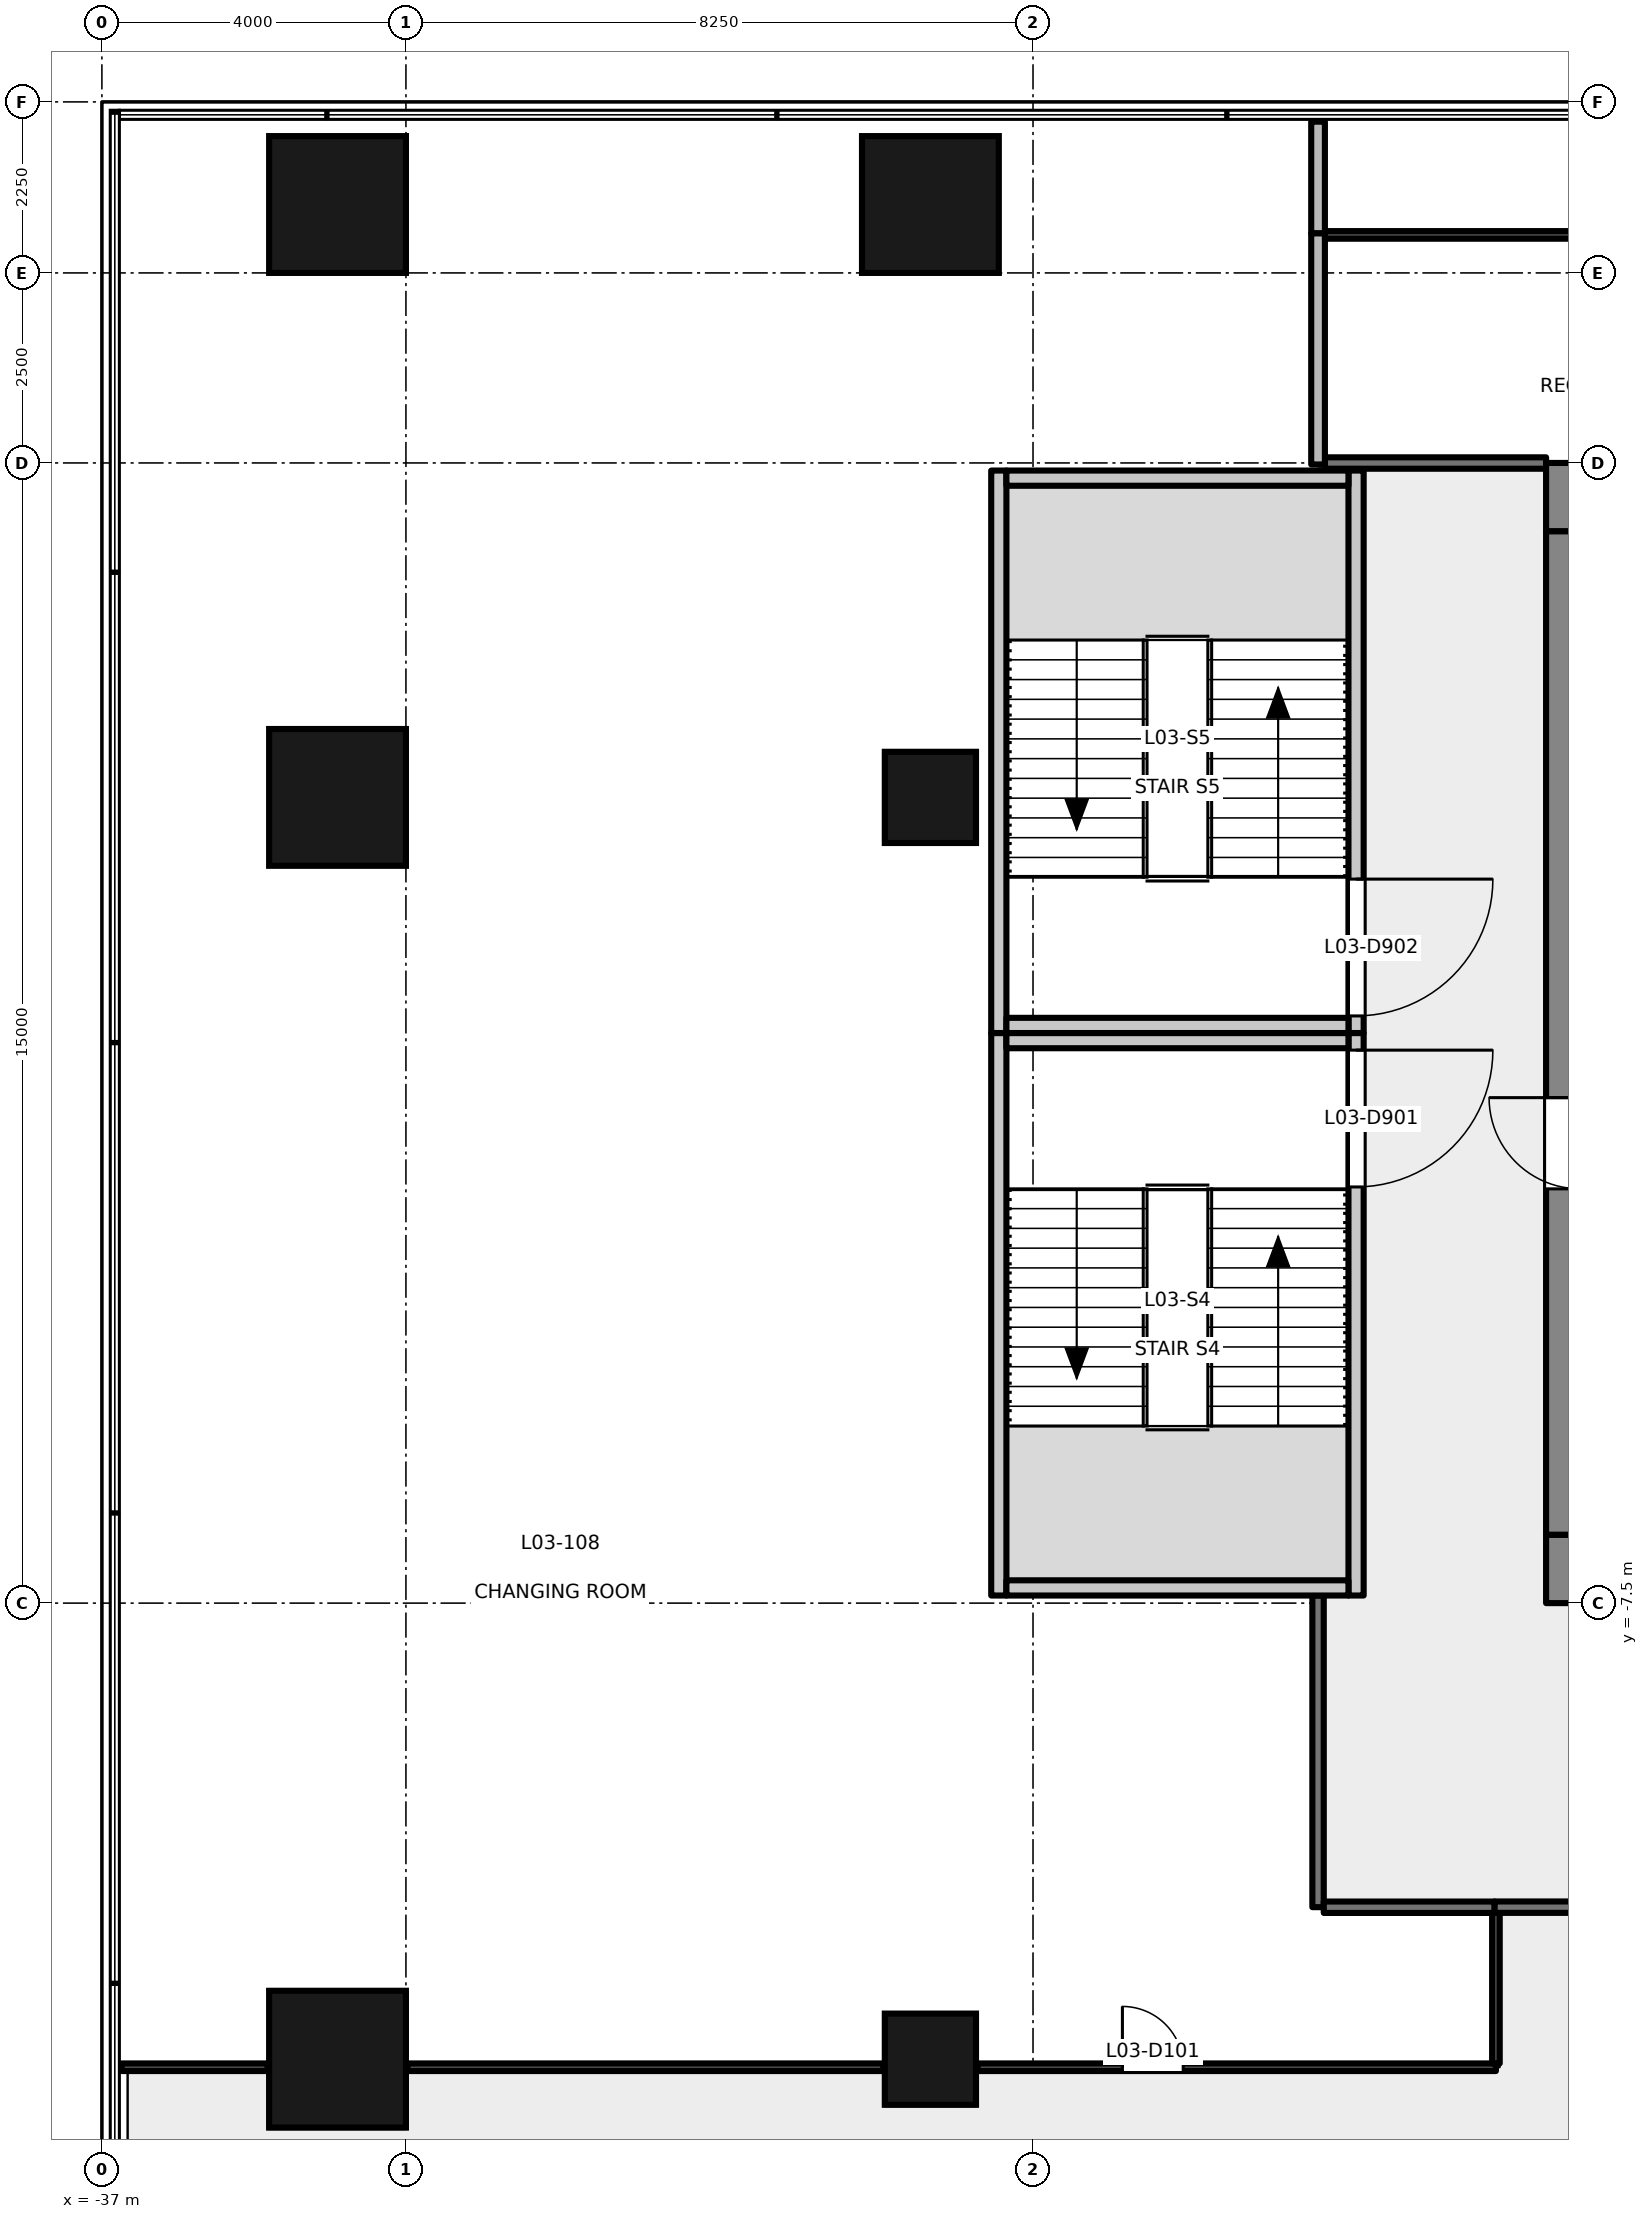
"""IFC4 building model, lengths in metres.
Left out: names, types, materials, properties, quantities, classifications, styles, units other than length and angle.
Written with IfcOpenShell. Run it as: python <this file> out.ifc"""

import sys

from ifc_helpers import new_model, si_unit, direction, frame, frame_2d, origin, origin_2d, place, context, subcontext, project, spatial, rectangle, extrude, element, fill, save


model = new_model("IFC4")
c1 = context("Model", 3, precision=1e-05, world=origin(), true_north=direction((0.0, 1.0)))
c2 = subcontext(c1, "Body", "Model", "MODEL_VIEW")
j1 = project(units=[si_unit("LENGTHUNIT", "METRE"), si_unit("PLANEANGLEUNIT", "RADIAN")], contexts=[c1])
p1 = place(None, origin())
s1 = spatial("IfcSite", under=j1, at=p1, CompositionType="ELEMENT")
p2 = place(p1, origin())
s2 = spatial("IfcBuilding", under=s1, at=p2, CompositionType="ELEMENT")
p3 = place(p2, frame((0.0, 0.0, 17.4)))
s3 = spatial("IfcBuildingStorey", under=s2, at=p3, CompositionType="ELEMENT", Elevation=17.4)
for number, where, z_axis, x_axis in (
    (1, (-33.9, 10.9, -0.2), (0.0, 0.0, 1.0), (1.0, 0.0, 0.0)),
    (2, (-33.9, -13.5, -0.2), (0.0, 0.0, 1.0), (0.0, 1.0, 0.0)),
    (3, (-33.9, 3.1, -0.2), (0.0, 0.0, 1.0), (0.0, 1.0, 0.0)),
    (4, (-26.1, 10.9, -0.2), (0.0, 0.0, 1.0), (1.0, 0.0, 0.0)),
):
    element("IfcColumn", number, at=place(p3, frame(where, z_axis=z_axis, x_axis=x_axis)), inside=s3, PredefinedType="COLUMN", context=c2, shape_type="SweptSolid", body=[
        extrude(rectangle(XDim=1.8, YDim=1.8, at=origin_2d()), origin(), (0.0, 0.0, 1.0), 4.8),
    ])
for number, where, z_axis, x_axis in (
    (5, (-26.1, -13.5, -0.2), (0.0, 0.0, 1.0), (1.0, 0.0, 0.0)),
    (6, (-26.1, 3.1, -0.2), (0.0, 0.0, 1.0), (1.0, 0.0, 0.0)),
):
    element("IfcColumn", number, at=place(p3, frame(where, z_axis=z_axis, x_axis=x_axis)), inside=s3, PredefinedType="COLUMN", context=c2, shape_type="SweptSolid", body=[
        extrude(rectangle(XDim=1.2, YDim=1.2, at=origin_2d()), origin(), (0.0, 0.0, 1.0), 4.8),
    ])
p4 = place(p3, frame((-18.0, -7.05, -0.2), z_axis=(0.0, 0.0, 1.0), x_axis=(1.0, 0.0, 0.0)))
e7 = element("IfcWall", 7, at=p4, inside=s3, PredefinedType="SHEAR", context=c2, shape_type="SweptSolid", body=[
    extrude(rectangle(XDim=36.0, YDim=0.9, at=frame_2d((18.0, 0.0))), origin(), (0.0, 0.0, 1.0), 4.8),
])
p5 = place(p4, frame((7.8, 0.0, 0.2)))
e8 = element("IfcOpeningElement", 8, at=p5, cuts=e7, PredefinedType="OPENING", context=c2, shape_type="SweptSolid", body=[
    extrude(rectangle(XDim=2.4, YDim=2.1, at=frame_2d((1.2, 1.05))), frame((0.0, 0.46, 0.0), z_axis=(0.0, -1.0, 0.0), x_axis=(1.0, 0.0, 0.0)), (0.0, 0.0, 1.0), 0.921),
])
p6 = place(p4, frame((17.4, 0.0, 0.2)))
e9 = element("IfcOpeningElement", 9, at=p6, cuts=e7, PredefinedType="OPENING", context=c2, shape_type="SweptSolid", body=[
    extrude(rectangle(XDim=1.2, YDim=2.1, at=frame_2d((0.6, 1.05))), frame((0.0, 0.46, 0.0), z_axis=(0.0, -1.0, 0.0), x_axis=(1.0, 0.0, 0.0)), (0.0, 0.0, 1.0), 0.921),
])
p7 = place(p4, frame((26.1, 0.0, 0.2)))
e10 = element("IfcOpeningElement", 10, at=p7, cuts=e7, PredefinedType="OPENING", context=c2, shape_type="SweptSolid", body=[
    extrude(rectangle(XDim=2.4, YDim=2.1, at=frame_2d((1.2, 1.05))), frame((0.0, 0.46, 0.0), z_axis=(0.0, -1.0, 0.0), x_axis=(1.0, 0.0, 0.0)), (0.0, 0.0, 1.0), 0.921),
])
p8 = place(p3, frame((-18.0, 7.05, -0.2), z_axis=(0.0, 0.0, 1.0), x_axis=(1.0, 0.0, 0.0)))
e11 = element("IfcWall", 11, at=p8, inside=s3, PredefinedType="SHEAR", context=c2, shape_type="SweptSolid", body=[
    extrude(rectangle(XDim=36.0, YDim=0.9, at=frame_2d((18.0, 0.0))), origin(), (0.0, 0.0, 1.0), 4.8),
])
p9 = place(p3, frame((-17.55, -6.6, -0.2), z_axis=(0.0, 0.0, 1.0), x_axis=(0.0, 1.0, 0.0)))
e12 = element("IfcWall", 12, at=p9, inside=s3, PredefinedType="SHEAR", context=c2, shape_type="SweptSolid", body=[
    extrude(rectangle(XDim=13.2, YDim=0.9, at=frame_2d((6.6, 0.0))), origin(), (0.0, 0.0, 1.0), 4.8),
])
p10 = place(p9, frame((4.55, 0.0, 0.2)))
e13 = element("IfcOpeningElement", 13, at=p10, cuts=e12, PredefinedType="OPENING", context=c2, shape_type="SweptSolid", body=[
    extrude(rectangle(XDim=1.2, YDim=2.1, at=frame_2d((0.6, 1.05))), frame((0.0, 0.46, 0.0), z_axis=(0.0, -1.0, 0.0), x_axis=(1.0, 0.0, 0.0)), (0.0, 0.0, 1.0), 0.921),
])
p11 = place(p3, frame((-20.5, 0.0, -0.2), z_axis=(0.0, 0.0, 1.0), x_axis=(0.0, -1.0, 0.0)))
e14 = element("IfcWall", 14, at=p11, inside=s3, PredefinedType="SHEAR", context=c2, shape_type="SweptSolid", body=[
    extrude(rectangle(XDim=7.4, YDim=0.2, at=frame_2d((3.7, 0.0))), origin(), (0.0, 0.0, 1.0), 4.8),
])
p12 = place(p11, frame((0.225, 0.0, 0.2)))
e15 = element("IfcOpeningElement", 15, at=p12, cuts=e14, PredefinedType="OPENING", context=c2, shape_type="SweptSolid", body=[
    extrude(rectangle(XDim=1.8, YDim=2.1, at=frame_2d((0.9, 1.05))), frame((0.0, 0.111, 0.0), z_axis=(0.0, -1.0, 0.0), x_axis=(1.0, 0.0, 0.0)), (0.0, 0.0, 1.0), 0.221),
])
p13 = place(p3, frame((-25.2, -7.4, -0.2), z_axis=(0.0, 0.0, 1.0), x_axis=(0.0, 1.0, 0.0)))
e16 = element("IfcWall", 16, at=p13, inside=s3, PredefinedType="SHEAR", context=c2, shape_type="SweptSolid", body=[
    extrude(rectangle(XDim=7.4, YDim=0.2, at=frame_2d((3.7, 0.0))), origin(), (0.0, 0.0, 1.0), 4.8),
])
for number, where, z_axis, x_axis in (
    (17, (-25.1, -0.1, -0.2), (0.0, 0.0, 1.0), (1.0, 0.0, 0.0)),
    (18, (-25.1, -7.3, -0.2), (0.0, 0.0, 1.0), (1.0, 0.0, 0.0)),
):
    element("IfcWall", number, at=place(p3, frame(where, z_axis=z_axis, x_axis=x_axis)), inside=s3, PredefinedType="SHEAR", context=c2, shape_type="SweptSolid", body=[
        extrude(rectangle(XDim=4.5, YDim=0.2, at=frame_2d((2.25, 0.0))), origin(), (0.0, 0.0, 1.0), 4.8),
    ])
p14 = place(p3, frame((-20.5, 7.4, -0.2), z_axis=(0.0, 0.0, 1.0), x_axis=(0.0, -1.0, 0.0)))
e19 = element("IfcWall", 19, at=p14, inside=s3, PredefinedType="SHEAR", context=c2, shape_type="SweptSolid", body=[
    extrude(rectangle(XDim=7.4, YDim=0.2, at=frame_2d((3.7, 0.0))), origin(), (0.0, 0.0, 1.0), 4.8),
])
p15 = place(p14, frame((5.375, 0.0, 0.2)))
e20 = element("IfcOpeningElement", 20, at=p15, cuts=e19, PredefinedType="OPENING", context=c2, shape_type="SweptSolid", body=[
    extrude(rectangle(XDim=1.8, YDim=2.1, at=frame_2d((0.9, 1.05))), frame((0.0, 0.111, 0.0), z_axis=(0.0, -1.0, 0.0), x_axis=(1.0, 0.0, 0.0)), (0.0, 0.0, 1.0), 0.221),
])
p16 = place(p3, frame((-25.2, 0.0, -0.2), z_axis=(0.0, 0.0, 1.0), x_axis=(0.0, 1.0, 0.0)))
e21 = element("IfcWall", 21, at=p16, inside=s3, PredefinedType="SHEAR", context=c2, shape_type="SweptSolid", body=[
    extrude(rectangle(XDim=7.4, YDim=0.2, at=frame_2d((3.7, 0.0))), origin(), (0.0, 0.0, 1.0), 4.8),
])
for number, where, z_axis, x_axis in (
    (22, (-25.1, 7.3, -0.2), (0.0, 0.0, 1.0), (1.0, 0.0, 0.0)),
    (23, (-25.1, 0.1, -0.2), (0.0, 0.0, 1.0), (1.0, 0.0, 0.0)),
):
    element("IfcWall", number, at=place(p3, frame(where, z_axis=z_axis, x_axis=x_axis)), inside=s3, PredefinedType="SHEAR", context=c2, shape_type="SweptSolid", body=[
        extrude(rectangle(XDim=4.5, YDim=0.2, at=frame_2d((2.25, 0.0))), origin(), (0.0, 0.0, 1.0), 4.8),
    ])
p17 = place(p3, frame((-10.45, -11.5, 0.0), z_axis=(0.0, 0.0, 1.0), x_axis=(-1.0, 0.0, 0.0)))
e24 = element("IfcWall", 24, at=p17, inside=s3, PredefinedType="PARTITIONING", context=c2, shape_type="SweptSolid", body=[
    extrude(rectangle(XDim=8.23, YDim=0.15, at=frame_2d((4.115, 0.0))), origin(), (0.0, 0.0, 1.0), 3.2),
])
p18 = place(p17, frame((1.733, 0.0, 0.0)))
e25 = element("IfcOpeningElement", 25, at=p18, cuts=e24, PredefinedType="OPENING", context=c2, shape_type="SweptSolid", body=[
    extrude(rectangle(XDim=1.8, YDim=2.1, at=frame_2d((0.9, 1.05))), frame((0.0, 0.085, 0.0), z_axis=(0.0, -1.0, 0.0), x_axis=(1.0, 0.0, 0.0)), (0.0, 0.0, 1.0), 0.171),
])
p19 = place(p17, frame((4.646, 0.0, 0.0)))
e26 = element("IfcOpeningElement", 26, at=p19, cuts=e24, PredefinedType="OPENING", context=c2, shape_type="SweptSolid", body=[
    extrude(rectangle(XDim=2.4, YDim=2.4, at=frame_2d((1.2, 1.2))), frame((0.0, 0.085, 0.0), z_axis=(0.0, -1.0, 0.0), x_axis=(1.0, 0.0, 0.0)), (0.0, 0.0, 1.0), 0.171),
])
p20 = place(p3, frame((-21.0, -11.5, 0.0), z_axis=(0.0, 0.0, 1.0), x_axis=(0.0, 1.0, 0.0)))
e27 = element("IfcWall", 27, at=p20, inside=s3, PredefinedType="PARTITIONING", context=c2, shape_type="SweptSolid", body=[
    extrude(rectangle(XDim=4.1, YDim=0.15, at=frame_2d((2.05, 0.0))), origin(), (0.0, 0.0, 1.0), 4.6),
])
p21 = place(p3, frame((-18.68, -11.501, 0.0), z_axis=(0.0, 0.0, 1.0), x_axis=(-1.0, 0.0, 0.0)))
e28 = element("IfcWall", 28, at=p21, inside=s3, PredefinedType="PARTITIONING", context=c2, shape_type="SweptSolid", body=[
    extrude(rectangle(XDim=2.245, YDim=0.15, at=frame_2d((1.123, 0.0))), origin(), (0.0, 0.0, 1.0), 4.6),
])
p22 = place(p3, frame((-20.91, 7.499, 0.0), z_axis=(0.0, 0.0, 1.0), x_axis=(1.0, 0.0, 0.0)))
e29 = element("IfcWall", 29, at=p22, inside=s3, PredefinedType="PARTITIONING", context=c2, shape_type="SweptSolid", body=[
    extrude(rectangle(XDim=2.91, YDim=0.15, at=frame_2d((1.455, 0.0))), origin(), (0.0, 0.0, 1.0), 4.3),
])
p23 = place(p3, frame((-36.74, -13.606, 0.0), z_axis=(0.0, 0.0, 1.0), x_axis=(1.0, 0.0, 0.0)))
e30 = element("IfcWall", 30, at=p23, inside=s3, PredefinedType="PARTITIONING", context=c2, shape_type="SweptSolid", body=[
    extrude(rectangle(XDim=1.92, YDim=0.1, at=frame_2d((0.96, 0.0))), origin(), (0.0, 0.0, 1.0), 4.6),
])
p24 = place(p3, frame((-32.98, -13.606, 0.0), z_axis=(0.0, 0.0, 1.0), x_axis=(1.0, 0.0, 0.0)))
e31 = element("IfcWall", 31, at=p24, inside=s3, PredefinedType="PARTITIONING", context=c2, shape_type="SweptSolid", body=[
    extrude(rectangle(XDim=6.26, YDim=0.1, at=frame_2d((3.13, 0.0))), origin(), (0.0, 0.0, 1.0), 3.6),
])
p25 = place(p3, frame((-25.48, -13.606, 0.0), z_axis=(0.0, 0.0, 1.0), x_axis=(1.0, 0.0, 0.0)))
e32 = element("IfcWall", 32, at=p25, inside=s3, PredefinedType="PARTITIONING", context=c2, shape_type="SweptSolid", body=[
    extrude(rectangle(XDim=6.82, YDim=0.1, at=frame_2d((3.41, 0.0))), origin(), (0.0, 0.0, 1.0), 3.6),
])
p26 = place(p25, frame((1.906, 0.0, 0.0)))
e33 = element("IfcOpeningElement", 33, at=p26, cuts=e32, PredefinedType="OPENING", context=c2, shape_type="SweptSolid", body=[
    extrude(rectangle(XDim=0.8, YDim=2.1, at=frame_2d((0.4, 1.05))), frame((0.0, 0.061, 0.0), z_axis=(0.0, -1.0, 0.0), x_axis=(1.0, 0.0, 0.0)), (0.0, 0.0, 1.0), 0.121),
])
p27 = place(p3, frame((-18.66, -13.556, 0.0), z_axis=(0.0, 0.0, 1.0), x_axis=(0.0, 1.0, 0.0)))
e34 = element("IfcWall", 34, at=p27, inside=s3, PredefinedType="PARTITIONING", context=c2, shape_type="SweptSolid", body=[
    extrude(rectangle(XDim=1.981, YDim=0.1, at=frame_2d((0.99, 0.0))), origin(), (0.0, 0.0, 1.0), 3.6),
])
p28 = place(p3, frame((-21.0, 11.99, 0.0), z_axis=(0.0, 0.0, 1.0), x_axis=(0.0, -1.0, 0.0)))
e35 = element("IfcWall", 35, at=p28, inside=s3, PredefinedType="PARTITIONING", context=c2, shape_type="SweptSolid", body=[
    extrude(rectangle(XDim=1.47, YDim=0.18, at=frame_2d((0.735, 0.0))), origin(), (0.0, 0.0, 1.0), 3.6),
])
p29 = place(p3, frame((-21.0, 10.52, 0.0), z_axis=(0.0, 0.0, 1.0), x_axis=(0.0, -1.0, 0.0)))
e36 = element("IfcWall", 36, at=p29, inside=s3, PredefinedType="PARTITIONING", context=c2, shape_type="SweptSolid", body=[
    extrude(rectangle(XDim=3.04, YDim=0.18, at=frame_2d((1.52, 0.0))), origin(), (0.0, 0.0, 1.0), 4.6),
])
p30 = place(p3, frame((-14.42, 10.5, 0.0), z_axis=(0.0, 0.0, 1.0), x_axis=(-1.0, 0.0, 0.0)))
e37 = element("IfcWall", 37, at=p30, inside=s3, PredefinedType="PARTITIONING", context=c2, shape_type="SweptSolid", body=[
    extrude(rectangle(XDim=6.49, YDim=0.1, at=frame_2d((3.245, 0.0))), origin(), (0.0, 0.0, 1.0), 4.3),
])
p31 = place(p30, frame((1.777, 0.0, 0.0)))
e38 = element("IfcOpeningElement", 38, at=p31, cuts=e37, PredefinedType="OPENING", context=c2, shape_type="SweptSolid", body=[
    extrude(rectangle(XDim=0.9, YDim=2.1, at=frame_2d((0.45, 1.05))), frame((0.0, 0.061, 0.0), z_axis=(0.0, -1.0, 0.0), x_axis=(1.0, 0.0, 0.0)), (0.0, 0.0, 1.0), 0.121),
])
p32 = place(p12, origin())
e39 = element("IfcDoor", 39, at=p32, inside=s3, OperationType="DOUBLE_DOOR_SINGLE_SWING", PredefinedType="DOOR", context=c2, shape_type="SweptSolid", body=[
    extrude(rectangle(XDim=1.8, YDim=2.1, at=frame_2d((0.9, 1.05))), frame((0.0, 0.025, 0.0), z_axis=(0.0, -1.0, 0.0), x_axis=(1.0, 0.0, 0.0)), (0.0, 0.0, 1.0), 0.05),
])
fill(e15, e39)
p33 = place(p15, origin())
e40 = element("IfcDoor", 40, at=p33, inside=s3, OperationType="DOUBLE_DOOR_SINGLE_SWING", PredefinedType="DOOR", context=c2, shape_type="SweptSolid", body=[
    extrude(rectangle(XDim=1.8, YDim=2.1, at=frame_2d((0.9, 1.05))), frame((0.0, 0.025, 0.0), z_axis=(0.0, -1.0, 0.0), x_axis=(1.0, 0.0, 0.0)), (0.0, 0.0, 1.0), 0.05),
])
fill(e20, e40)
p34 = place(p26, origin())
e41 = element("IfcDoor", 41, at=p34, inside=s3, OperationType="SINGLE_SWING_LEFT", PredefinedType="DOOR", context=c2, shape_type="SweptSolid", body=[
    extrude(rectangle(XDim=0.8, YDim=2.1, at=frame_2d((0.4, 1.05))), frame((0.0, 0.025, 0.0), z_axis=(0.0, -1.0, 0.0), x_axis=(1.0, 0.0, 0.0)), (0.0, 0.0, 1.0), 0.05),
])
fill(e33, e41)
save(model, sys.argv[1])
